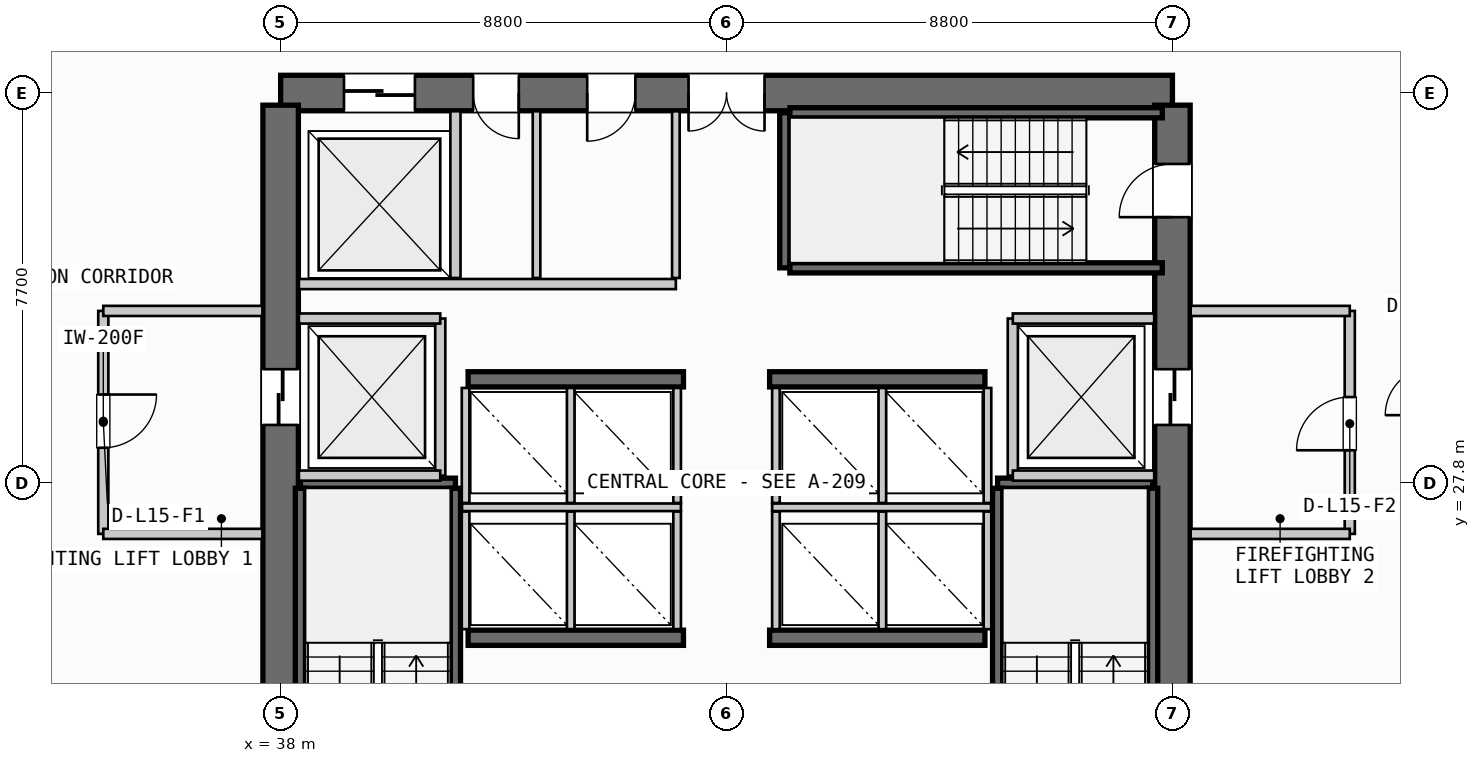
"""IFC4 building model, lengths in metres.
Left out: names, types, materials, properties, quantities, classifications, styles, units other than length and angle.
Written with IfcOpenShell. Run it as: python <this file> out.ifc"""

import sys

from ifc_helpers import new_model, si_unit, direction, frame, frame_2d, origin, place, context, subcontext, project, spatial, rectangle, extrude, source, transform, mapped, element, fill, save


model = new_model("IFC4")
c1 = context("Model", 3, precision=1e-05, world=origin(), true_north=direction((0.0, 1.0)))
c2 = subcontext(c1, "Body", "Model", "MODEL_VIEW")
j1 = project(units=[si_unit("LENGTHUNIT", "METRE"), si_unit("PLANEANGLEUNIT", "RADIAN")], contexts=[c1])
p1 = place(None, origin())
s1 = spatial("IfcSite", under=j1, at=p1, CompositionType="ELEMENT")
p2 = place(p1, origin())
s2 = spatial("IfcBuilding", under=s1, at=p2, CompositionType="ELEMENT")
p3 = place(p2, frame((0.0, 0.0, 63.8)))
s3 = spatial("IfcBuildingStorey", under=s2, at=p3, CompositionType="ELEMENT", Elevation=63.8)
p4 = place(p3, frame((55.6, 35.5, 0.0), z_axis=(0.0, 0.0, 1.0), x_axis=(-1.0, 0.0, 0.0)))
e1 = element("IfcWall", 1, at=p4, inside=s3, PredefinedType="SHEAR", context=c2, shape_type="SweptSolid", body=[
    extrude(rectangle(XDim=17.6, YDim=0.7, at=frame_2d((8.8, 0.0))), origin(), (0.0, 0.0, 1.0), 3.55),
])
p5 = place(p4, frame((8.05, 0.0, 0.0)))
e2 = element("IfcOpeningElement", 2, at=p5, cuts=e1, PredefinedType="OPENING", context=c2, shape_type="SweptSolid", body=[
    extrude(rectangle(XDim=1.5, YDim=2.2, at=frame_2d((0.75, 1.1))), frame((0.0, 0.36, 0.0), z_axis=(0.0, -1.0, 0.0), x_axis=(1.0, 0.0, 0.0)), (0.0, 0.0, 1.0), 0.72),
])
p6 = place(p4, frame((14.95, 0.0, 0.0)))
e3 = element("IfcOpeningElement", 3, at=p6, cuts=e1, PredefinedType="OPENING", context=c2, shape_type="SweptSolid", body=[
    extrude(rectangle(XDim=1.4, YDim=2.3, at=frame_2d((0.7, 1.15))), frame((0.0, 0.36, 0.0), z_axis=(0.0, -1.0, 0.0), x_axis=(1.0, 0.0, 0.0)), (0.0, 0.0, 1.0), 0.72),
])
p7 = place(p4, frame((12.9, 0.0, 0.0)))
e4 = element("IfcOpeningElement", 4, at=p7, cuts=e1, PredefinedType="OPENING", context=c2, shape_type="SweptSolid", body=[
    extrude(rectangle(XDim=0.9, YDim=2.15, at=frame_2d((0.45, 1.075))), frame((0.0, 0.36, 0.0), z_axis=(0.0, -1.0, 0.0), x_axis=(1.0, 0.0, 0.0)), (0.0, 0.0, 1.0), 0.72),
])
p8 = place(p4, frame((10.6, 0.0, 0.0)))
e5 = element("IfcOpeningElement", 5, at=p8, cuts=e1, PredefinedType="OPENING", context=c2, shape_type="SweptSolid", body=[
    extrude(rectangle(XDim=0.95, YDim=2.15, at=frame_2d((0.475, 1.075))), frame((0.0, 0.36, 0.0), z_axis=(0.0, -1.0, 0.0), x_axis=(1.0, 0.0, 0.0)), (0.0, 0.0, 1.0), 0.72),
])
p9 = place(p3, frame((38.0, 35.26, 0.0), z_axis=(0.0, 0.0, 1.0), x_axis=(0.0, -1.0, 0.0)))
e6 = element("IfcWall", 6, at=p9, inside=s3, PredefinedType="SHEAR", context=c2, shape_type="SweptSolid", body=[
    extrude(rectangle(XDim=14.92, YDim=0.7, at=frame_2d((7.46, 0.0))), origin(), (0.0, 0.0, 1.0), 3.55),
])
p10 = place(p9, frame((5.21, 0.0, 0.0)))
e7 = element("IfcOpeningElement", 7, at=p10, cuts=e6, PredefinedType="OPENING", context=c2, shape_type="SweptSolid", body=[
    extrude(rectangle(XDim=1.1, YDim=2.2, at=frame_2d((0.55, 1.1))), frame((0.0, 0.36, 0.0), z_axis=(0.0, -1.0, 0.0), x_axis=(1.0, 0.0, 0.0)), (0.0, 0.0, 1.0), 0.72),
])
p11 = place(p3, frame((55.6, 20.34, 0.0), z_axis=(0.0, 0.0, 1.0), x_axis=(0.0, 1.0, 0.0)))
e8 = element("IfcWall", 8, at=p11, inside=s3, PredefinedType="SHEAR", context=c2, shape_type="SweptSolid", body=[
    extrude(rectangle(XDim=14.92, YDim=0.7, at=frame_2d((7.46, 0.0))), origin(), (0.0, 0.0, 1.0), 3.55),
])
p12 = place(p11, frame((12.71, 0.0, 0.0)))
e9 = element("IfcOpeningElement", 9, at=p12, cuts=e8, PredefinedType="OPENING", context=c2, shape_type="SweptSolid", body=[
    extrude(rectangle(XDim=1.05, YDim=2.15, at=frame_2d((0.525, 1.075))), frame((0.0, 0.36, 0.0), z_axis=(0.0, -1.0, 0.0), x_axis=(1.0, 0.0, 0.0)), (0.0, 0.0, 1.0), 0.72),
])
p13 = place(p11, frame((8.61, 0.0, 0.0)))
e10 = element("IfcOpeningElement", 10, at=p13, cuts=e8, PredefinedType="OPENING", context=c2, shape_type="SweptSolid", body=[
    extrude(rectangle(XDim=1.1, YDim=2.2, at=frame_2d((0.55, 1.1))), frame((0.0, 0.36, 0.0), z_axis=(0.0, -1.0, 0.0), x_axis=(1.0, 0.0, 0.0)), (0.0, 0.0, 1.0), 0.72),
])
for number, where, z_axis, x_axis in (
    (11, (41.7, 24.75, 0.0), (0.0, 0.0, 1.0), (1.0, 0.0, 0.0)),
    (12, (47.65, 24.75, 0.0), (0.0, 0.0, 1.0), (1.0, 0.0, 0.0)),
    (13, (41.7, 29.85, 0.0), (0.0, 0.0, 1.0), (1.0, 0.0, 0.0)),
    (14, (47.65, 29.85, 0.0), (0.0, 0.0, 1.0), (1.0, 0.0, 0.0)),
):
    element("IfcWall", number, at=place(p3, frame(where, z_axis=z_axis, x_axis=x_axis)), inside=s3, PredefinedType="SHEAR", context=c2, shape_type="SweptSolid", body=[
        extrude(rectangle(XDim=4.25, YDim=0.3, at=frame_2d((2.125, 0.0))), origin(), (0.0, 0.0, 1.0), 3.55),
    ])
p14 = place(p3, frame((38.39, 27.8, 0.0), z_axis=(0.0, 0.0, 1.0), x_axis=(1.0, 0.0, 0.0)))
e15 = element("IfcWall", 15, at=p14, inside=s3, PredefinedType="SHEAR", context=c2, shape_type="SweptSolid", body=[
    extrude(rectangle(XDim=3.06, YDim=0.2, at=frame_2d((1.53, 0.0))), origin(), (0.0, 0.0, 1.0), 3.55),
])
for number, where, z_axis, x_axis in (
    (16, (41.45, 27.7, 0.0), (0.0, 0.0, 1.0), (0.0, -1.0, 0.0)),
    (17, (38.39, 20.35, 0.0), (0.0, 0.0, 1.0), (0.0, 1.0, 0.0)),
):
    element("IfcWall", number, at=place(p3, frame(where, z_axis=z_axis, x_axis=x_axis)), inside=s3, PredefinedType="SHEAR", context=c2, shape_type="SweptSolid", body=[
        extrude(rectangle(XDim=7.35, YDim=0.2, at=frame_2d((3.675, 0.0))), origin(), (0.0, 0.0, 1.0), 3.55),
    ])
p15 = place(p3, frame((52.15, 27.8, 0.0), z_axis=(0.0, 0.0, 1.0), x_axis=(1.0, 0.0, 0.0)))
e18 = element("IfcWall", 18, at=p15, inside=s3, PredefinedType="SHEAR", context=c2, shape_type="SweptSolid", body=[
    extrude(rectangle(XDim=3.06, YDim=0.2, at=frame_2d((1.53, 0.0))), origin(), (0.0, 0.0, 1.0), 3.55),
])
for number, where, z_axis, x_axis in (
    (19, (55.21, 27.7, 0.0), (0.0, 0.0, 1.0), (0.0, -1.0, 0.0)),
    (20, (52.15, 20.35, 0.0), (0.0, 0.0, 1.0), (0.0, 1.0, 0.0)),
):
    element("IfcWall", number, at=place(p3, frame(where, z_axis=z_axis, x_axis=x_axis)), inside=s3, PredefinedType="SHEAR", context=c2, shape_type="SweptSolid", body=[
        extrude(rectangle(XDim=7.35, YDim=0.2, at=frame_2d((3.675, 0.0))), origin(), (0.0, 0.0, 1.0), 3.55),
    ])
p16 = place(p3, frame((47.95, 32.05, 0.0), z_axis=(0.0, 0.0, 1.0), x_axis=(0.0, 1.0, 0.0)))
e21 = element("IfcWall", 21, at=p16, inside=s3, PredefinedType="SHEAR", context=c2, shape_type="SweptSolid", body=[
    extrude(rectangle(XDim=3.06, YDim=0.2, at=frame_2d((1.53, 0.0))), origin(), (0.0, 0.0, 1.0), 3.55),
])
for number, where, z_axis, x_axis in (
    (22, (48.05, 35.11, 0.0), (0.0, 0.0, 1.0), (1.0, 0.0, 0.0)),
    (23, (55.4, 32.05, 0.0), (0.0, 0.0, 1.0), (-1.0, 0.0, 0.0)),
):
    element("IfcWall", number, at=place(p3, frame(where, z_axis=z_axis, x_axis=x_axis)), inside=s3, PredefinedType="SHEAR", context=c2, shape_type="SweptSolid", body=[
        extrude(rectangle(XDim=7.35, YDim=0.2, at=frame_2d((3.675, 0.0))), origin(), (0.0, 0.0, 1.0), 3.55),
    ])
p17 = place(p3, frame((41.15, 27.95, 0.0), z_axis=(0.0, 0.0, 1.0), x_axis=(0.0, 1.0, 0.0)))
e24 = element("IfcWall", 24, at=p17, inside=s3, PredefinedType="PARTITIONING", context=c2, shape_type="SweptSolid", body=[
    extrude(rectangle(XDim=3.1, YDim=0.2, at=frame_2d((1.55, 0.0))), origin(), (0.0, 0.0, 1.0), 2.505),
])
for number, where, z_axis, x_axis in (
    (25, (38.36, 27.95, 0.0), (0.0, 0.0, 1.0), (1.0, 0.0, 0.0)),
    (26, (38.36, 31.05, 0.0), (0.0, 0.0, 1.0), (1.0, 0.0, 0.0)),
):
    element("IfcWall", number, at=place(p3, frame(where, z_axis=z_axis, x_axis=x_axis)), inside=s3, PredefinedType="PARTITIONING", context=c2, shape_type="SweptSolid", body=[
        extrude(rectangle(XDim=2.79, YDim=0.2, at=frame_2d((1.395, 0.0))), origin(), (0.0, 0.0, 1.0), 2.505),
    ])
p18 = place(p3, frame((34.5, 31.2, 0.0), z_axis=(0.0, 0.0, 1.0), x_axis=(0.0, -1.0, 0.0)))
e27 = element("IfcWall", 27, at=p18, inside=s3, PredefinedType="PARTITIONING", context=c2, shape_type="SweptSolid", body=[
    extrude(rectangle(XDim=4.4, YDim=0.2, at=frame_2d((2.2, 0.0))), origin(), (0.0, 0.0, 1.0), 2.505),
])
p19 = place(p18, frame((1.65, 0.0, 0.0)))
e28 = element("IfcOpeningElement", 28, at=p19, cuts=e27, PredefinedType="OPENING", context=c2, shape_type="SweptSolid", body=[
    extrude(rectangle(XDim=1.05, YDim=2.15, at=frame_2d((0.525, 1.075))), frame((0.0, 0.11, 0.0), z_axis=(0.0, -1.0, 0.0), x_axis=(1.0, 0.0, 0.0)), (0.0, 0.0, 1.0), 0.22),
])
for number, where, z_axis, x_axis in (
    (29, (34.5, 26.8, 0.0), (0.0, 0.0, 1.0), (1.0, 0.0, 0.0)),
    (30, (34.5, 31.2, 0.0), (0.0, 0.0, 1.0), (1.0, 0.0, 0.0)),
):
    element("IfcWall", number, at=place(p3, frame(where, z_axis=z_axis, x_axis=x_axis)), inside=s3, PredefinedType="PARTITIONING", context=c2, shape_type="SweptSolid", body=[
        extrude(rectangle(XDim=3.14, YDim=0.2, at=frame_2d((1.57, 0.0))), origin(), (0.0, 0.0, 1.0), 2.505),
    ])
p20 = place(p3, frame((52.45, 27.95, 0.0), z_axis=(0.0, 0.0, 1.0), x_axis=(0.0, 1.0, 0.0)))
e31 = element("IfcWall", 31, at=p20, inside=s3, PredefinedType="PARTITIONING", context=c2, shape_type="SweptSolid", body=[
    extrude(rectangle(XDim=3.1, YDim=0.2, at=frame_2d((1.55, 0.0))), origin(), (0.0, 0.0, 1.0), 2.505),
])
for number, where, z_axis, x_axis in (
    (32, (52.45, 27.95, 0.0), (0.0, 0.0, 1.0), (1.0, 0.0, 0.0)),
    (33, (52.45, 31.05, 0.0), (0.0, 0.0, 1.0), (1.0, 0.0, 0.0)),
):
    element("IfcWall", number, at=place(p3, frame(where, z_axis=z_axis, x_axis=x_axis)), inside=s3, PredefinedType="PARTITIONING", context=c2, shape_type="SweptSolid", body=[
        extrude(rectangle(XDim=2.79, YDim=0.2, at=frame_2d((1.395, 0.0))), origin(), (0.0, 0.0, 1.0), 2.505),
    ])
p21 = place(p3, frame((59.1, 26.8, 0.0), z_axis=(0.0, 0.0, 1.0), x_axis=(0.0, 1.0, 0.0)))
e34 = element("IfcWall", 34, at=p21, inside=s3, PredefinedType="PARTITIONING", context=c2, shape_type="SweptSolid", body=[
    extrude(rectangle(XDim=4.4, YDim=0.2, at=frame_2d((2.2, 0.0))), origin(), (0.0, 0.0, 1.0), 2.505),
])
p22 = place(p21, frame((1.65, 0.0, 0.0)))
e35 = element("IfcOpeningElement", 35, at=p22, cuts=e34, PredefinedType="OPENING", context=c2, shape_type="SweptSolid", body=[
    extrude(rectangle(XDim=1.05, YDim=2.15, at=frame_2d((0.525, 1.075))), frame((0.0, 0.11, 0.0), z_axis=(0.0, -1.0, 0.0), x_axis=(1.0, 0.0, 0.0)), (0.0, 0.0, 1.0), 0.22),
])
for number, where, z_axis, x_axis in (
    (36, (55.96, 26.8, 0.0), (0.0, 0.0, 1.0), (1.0, 0.0, 0.0)),
    (37, (55.96, 31.2, 0.0), (0.0, 0.0, 1.0), (1.0, 0.0, 0.0)),
):
    element("IfcWall", number, at=place(p3, frame(where, z_axis=z_axis, x_axis=x_axis)), inside=s3, PredefinedType="PARTITIONING", context=c2, shape_type="SweptSolid", body=[
        extrude(rectangle(XDim=3.14, YDim=0.2, at=frame_2d((1.57, 0.0))), origin(), (0.0, 0.0, 1.0), 2.505),
    ])
p23 = place(p3, frame((41.58, 27.325, 0.0), z_axis=(0.0, 0.0, 1.0), x_axis=(1.0, 0.0, 0.0)))
e38 = element("IfcWall", 38, at=p23, inside=s3, PredefinedType="PARTITIONING", context=c2, shape_type="SweptSolid", body=[
    extrude(rectangle(XDim=4.32, YDim=0.15, at=frame_2d((2.16, 0.0))), origin(), (0.0, 0.0, 1.0), 2.505),
])
p24 = place(p3, frame((47.7, 27.325, 0.0), z_axis=(0.0, 0.0, 1.0), x_axis=(1.0, 0.0, 0.0)))
e39 = element("IfcWall", 39, at=p24, inside=s3, PredefinedType="PARTITIONING", context=c2, shape_type="SweptSolid", body=[
    extrude(rectangle(XDim=4.32, YDim=0.15, at=frame_2d((2.16, 0.0))), origin(), (0.0, 0.0, 1.0), 2.505),
])
for number, where, z_axis, x_axis in (
    (40, (41.65, 24.92, 0.0), (0.0, 0.0, 1.0), (0.0, 1.0, 0.0)),
    (41, (43.725, 24.92, 0.0), (0.0, 0.0, 1.0), (0.0, 1.0, 0.0)),
    (42, (45.825, 24.92, 0.0), (0.0, 0.0, 1.0), (0.0, 1.0, 0.0)),
    (43, (47.775, 24.92, 0.0), (0.0, 0.0, 1.0), (0.0, 1.0, 0.0)),
    (44, (49.875, 24.92, 0.0), (0.0, 0.0, 1.0), (0.0, 1.0, 0.0)),
    (45, (51.95, 24.92, 0.0), (0.0, 0.0, 1.0), (0.0, 1.0, 0.0)),
):
    element("IfcWall", number, at=place(p3, frame(where, z_axis=z_axis, x_axis=x_axis)), inside=s3, PredefinedType="PARTITIONING", context=c2, shape_type="SweptSolid", body=[
        extrude(rectangle(XDim=2.32, YDim=0.15, at=frame_2d((1.16, 0.0))), origin(), (0.0, 0.0, 1.0), 2.505),
    ])
for number, where, z_axis, x_axis in (
    (46, (41.65, 27.41, 0.0), (0.0, 0.0, 1.0), (0.0, 1.0, 0.0)),
    (47, (43.725, 27.41, 0.0), (0.0, 0.0, 1.0), (0.0, 1.0, 0.0)),
    (48, (45.825, 27.41, 0.0), (0.0, 0.0, 1.0), (0.0, 1.0, 0.0)),
    (49, (47.775, 27.41, 0.0), (0.0, 0.0, 1.0), (0.0, 1.0, 0.0)),
    (50, (49.875, 27.41, 0.0), (0.0, 0.0, 1.0), (0.0, 1.0, 0.0)),
    (51, (51.95, 27.41, 0.0), (0.0, 0.0, 1.0), (0.0, 1.0, 0.0)),
):
    element("IfcWall", number, at=place(p3, frame(where, z_axis=z_axis, x_axis=x_axis)), inside=s3, PredefinedType="PARTITIONING", context=c2, shape_type="SweptSolid", body=[
        extrude(rectangle(XDim=2.27, YDim=0.15, at=frame_2d((1.135, 0.0))), origin(), (0.0, 0.0, 1.0), 2.505),
    ])
p25 = place(p3, frame((41.45, 31.85, 0.0), z_axis=(0.0, 0.0, 1.0), x_axis=(0.0, 1.0, 0.0)))
e52 = element("IfcWall", 52, at=p25, inside=s3, PredefinedType="PARTITIONING", context=c2, shape_type="SweptSolid", body=[
    extrude(rectangle(XDim=3.29, YDim=0.2, at=frame_2d((1.645, 0.0))), origin(), (0.0, 0.0, 1.0), 2.505),
])
p26 = place(p3, frame((38.36, 31.73, 0.0), z_axis=(0.0, 0.0, 1.0), x_axis=(1.0, 0.0, 0.0)))
e53 = element("IfcWall", 53, at=p26, inside=s3, PredefinedType="PARTITIONING", context=c2, shape_type="SweptSolid", body=[
    extrude(rectangle(XDim=7.44, YDim=0.2, at=frame_2d((3.72, 0.0))), origin(), (0.0, 0.0, 1.0), 2.505),
])
p27 = place(p3, frame((45.8, 31.85, 0.0), z_axis=(0.0, 0.0, 1.0), x_axis=(0.0, 1.0, 0.0)))
e54 = element("IfcWall", 54, at=p27, inside=s3, PredefinedType="PARTITIONING", context=c2, shape_type="SweptSolid", body=[
    extrude(rectangle(XDim=3.29, YDim=0.15, at=frame_2d((1.645, 0.0))), origin(), (0.0, 0.0, 1.0), 2.505),
])
p28 = place(p3, frame((43.05, 31.85, 0.0), z_axis=(0.0, 0.0, 1.0), x_axis=(0.0, 1.0, 0.0)))
e55 = element("IfcWall", 55, at=p28, inside=s3, PredefinedType="PLUMBINGWALL", context=c2, shape_type="SweptSolid", body=[
    extrude(rectangle(XDim=3.29, YDim=0.15, at=frame_2d((1.645, 0.0))), origin(), (0.0, 0.0, 1.0), 2.505),
])
m1 = source(origin(), c2, "Body", "SweptSolid", [
    extrude(rectangle(XDim=1.05, YDim=2.15, at=frame_2d((0.525, 1.075))), frame((0.0, 0.025, 0.0), z_axis=(0.0, -1.0, 0.0), x_axis=(1.0, 0.0, 0.0)), (0.0, 0.0, 1.0), 0.05),
])
p29 = place(p12, origin())
e56 = element("IfcDoor", 56, at=p29, inside=s3, OperationType="SINGLE_SWING_LEFT", PredefinedType="DOOR", context=c2, shape_type="MappedRepresentation", body=[
    mapped(m1, transform((0.0, 0.0, 0.0), scale=1.0)),
])
fill(e9, e56)
m2 = source(origin(), c2, "Body", "SweptSolid", [
    extrude(rectangle(XDim=1.5, YDim=2.2, at=frame_2d((0.75, 1.1))), frame((0.0, 0.025, 0.0), z_axis=(0.0, -1.0, 0.0), x_axis=(1.0, 0.0, 0.0)), (0.0, 0.0, 1.0), 0.05),
])
p30 = place(p5, origin())
e57 = element("IfcDoor", 57, at=p30, inside=s3, OperationType="DOUBLE_DOOR_SINGLE_SWING", PredefinedType="DOOR", context=c2, shape_type="MappedRepresentation", body=[
    mapped(m2, transform((0.0, 0.0, 0.0), scale=1.0)),
])
fill(e2, e57)
m3 = source(origin(), c2, "Body", "SweptSolid", [
    extrude(rectangle(XDim=1.1, YDim=2.2, at=frame_2d((0.55, 1.1))), frame((0.0, 0.025, 0.0), z_axis=(0.0, -1.0, 0.0), x_axis=(1.0, 0.0, 0.0)), (0.0, 0.0, 1.0), 0.05),
])
p31 = place(p10, origin())
e58 = element("IfcDoor", 58, at=p31, inside=s3, OperationType="SLIDING_TO_LEFT", PredefinedType="DOOR", context=c2, shape_type="MappedRepresentation", body=[
    mapped(m3, transform((0.0, 0.0, 0.0), scale=1.0)),
])
fill(e7, e58)
p32 = place(p13, origin())
e59 = element("IfcDoor", 59, at=p32, inside=s3, OperationType="SLIDING_TO_RIGHT", PredefinedType="DOOR", context=c2, shape_type="MappedRepresentation", body=[
    mapped(m3, transform((0.0, 0.0, 0.0), scale=1.0)),
])
fill(e10, e59)
m4 = source(origin(), c2, "Body", "SweptSolid", [
    extrude(rectangle(XDim=1.4, YDim=2.3, at=frame_2d((0.7, 1.15))), frame((0.0, 0.025, 0.0), z_axis=(0.0, -1.0, 0.0), x_axis=(1.0, 0.0, 0.0)), (0.0, 0.0, 1.0), 0.05),
])
p33 = place(p6, origin())
e60 = element("IfcDoor", 60, at=p33, inside=s3, OperationType="SLIDING_TO_RIGHT", PredefinedType="DOOR", context=c2, shape_type="MappedRepresentation", body=[
    mapped(m4, transform((0.0, 0.0, 0.0), scale=1.0)),
])
fill(e3, e60)
m5 = source(origin(), c2, "Body", "SweptSolid", [
    extrude(rectangle(XDim=0.9, YDim=2.15, at=frame_2d((0.45, 1.075))), frame((0.0, 0.025, 0.0), z_axis=(0.0, -1.0, 0.0), x_axis=(1.0, 0.0, 0.0)), (0.0, 0.0, 1.0), 0.05),
])
p34 = place(p7, origin())
e61 = element("IfcDoor", 61, at=p34, inside=s3, OperationType="SINGLE_SWING_LEFT", PredefinedType="DOOR", context=c2, shape_type="MappedRepresentation", body=[
    mapped(m5, transform((0.0, 0.0, 0.0), scale=1.0)),
])
fill(e4, e61)
m6 = source(origin(), c2, "Body", "SweptSolid", [
    extrude(rectangle(XDim=0.95, YDim=2.15, at=frame_2d((0.475, 1.075))), frame((0.0, 0.025, 0.0), z_axis=(0.0, -1.0, 0.0), x_axis=(1.0, 0.0, 0.0)), (0.0, 0.0, 1.0), 0.05),
])
p35 = place(p8, origin())
e62 = element("IfcDoor", 62, at=p35, inside=s3, OperationType="SINGLE_SWING_RIGHT", PredefinedType="DOOR", context=c2, shape_type="MappedRepresentation", body=[
    mapped(m6, transform((0.0, 0.0, 0.0), scale=1.0)),
])
fill(e5, e62)
p36 = place(p19, origin())
e63 = element("IfcDoor", 63, at=p36, inside=s3, OperationType="SINGLE_SWING_LEFT", PredefinedType="DOOR", context=c2, shape_type="MappedRepresentation", body=[
    mapped(m1, transform((0.0, 0.0, 0.0), scale=1.0)),
])
fill(e28, e63)
p37 = place(p22, origin())
e64 = element("IfcDoor", 64, at=p37, inside=s3, OperationType="SINGLE_SWING_LEFT", PredefinedType="DOOR", context=c2, shape_type="MappedRepresentation", body=[
    mapped(m1, transform((0.0, 0.0, 0.0), scale=1.0)),
])
fill(e35, e64)
save(model, sys.argv[1])
